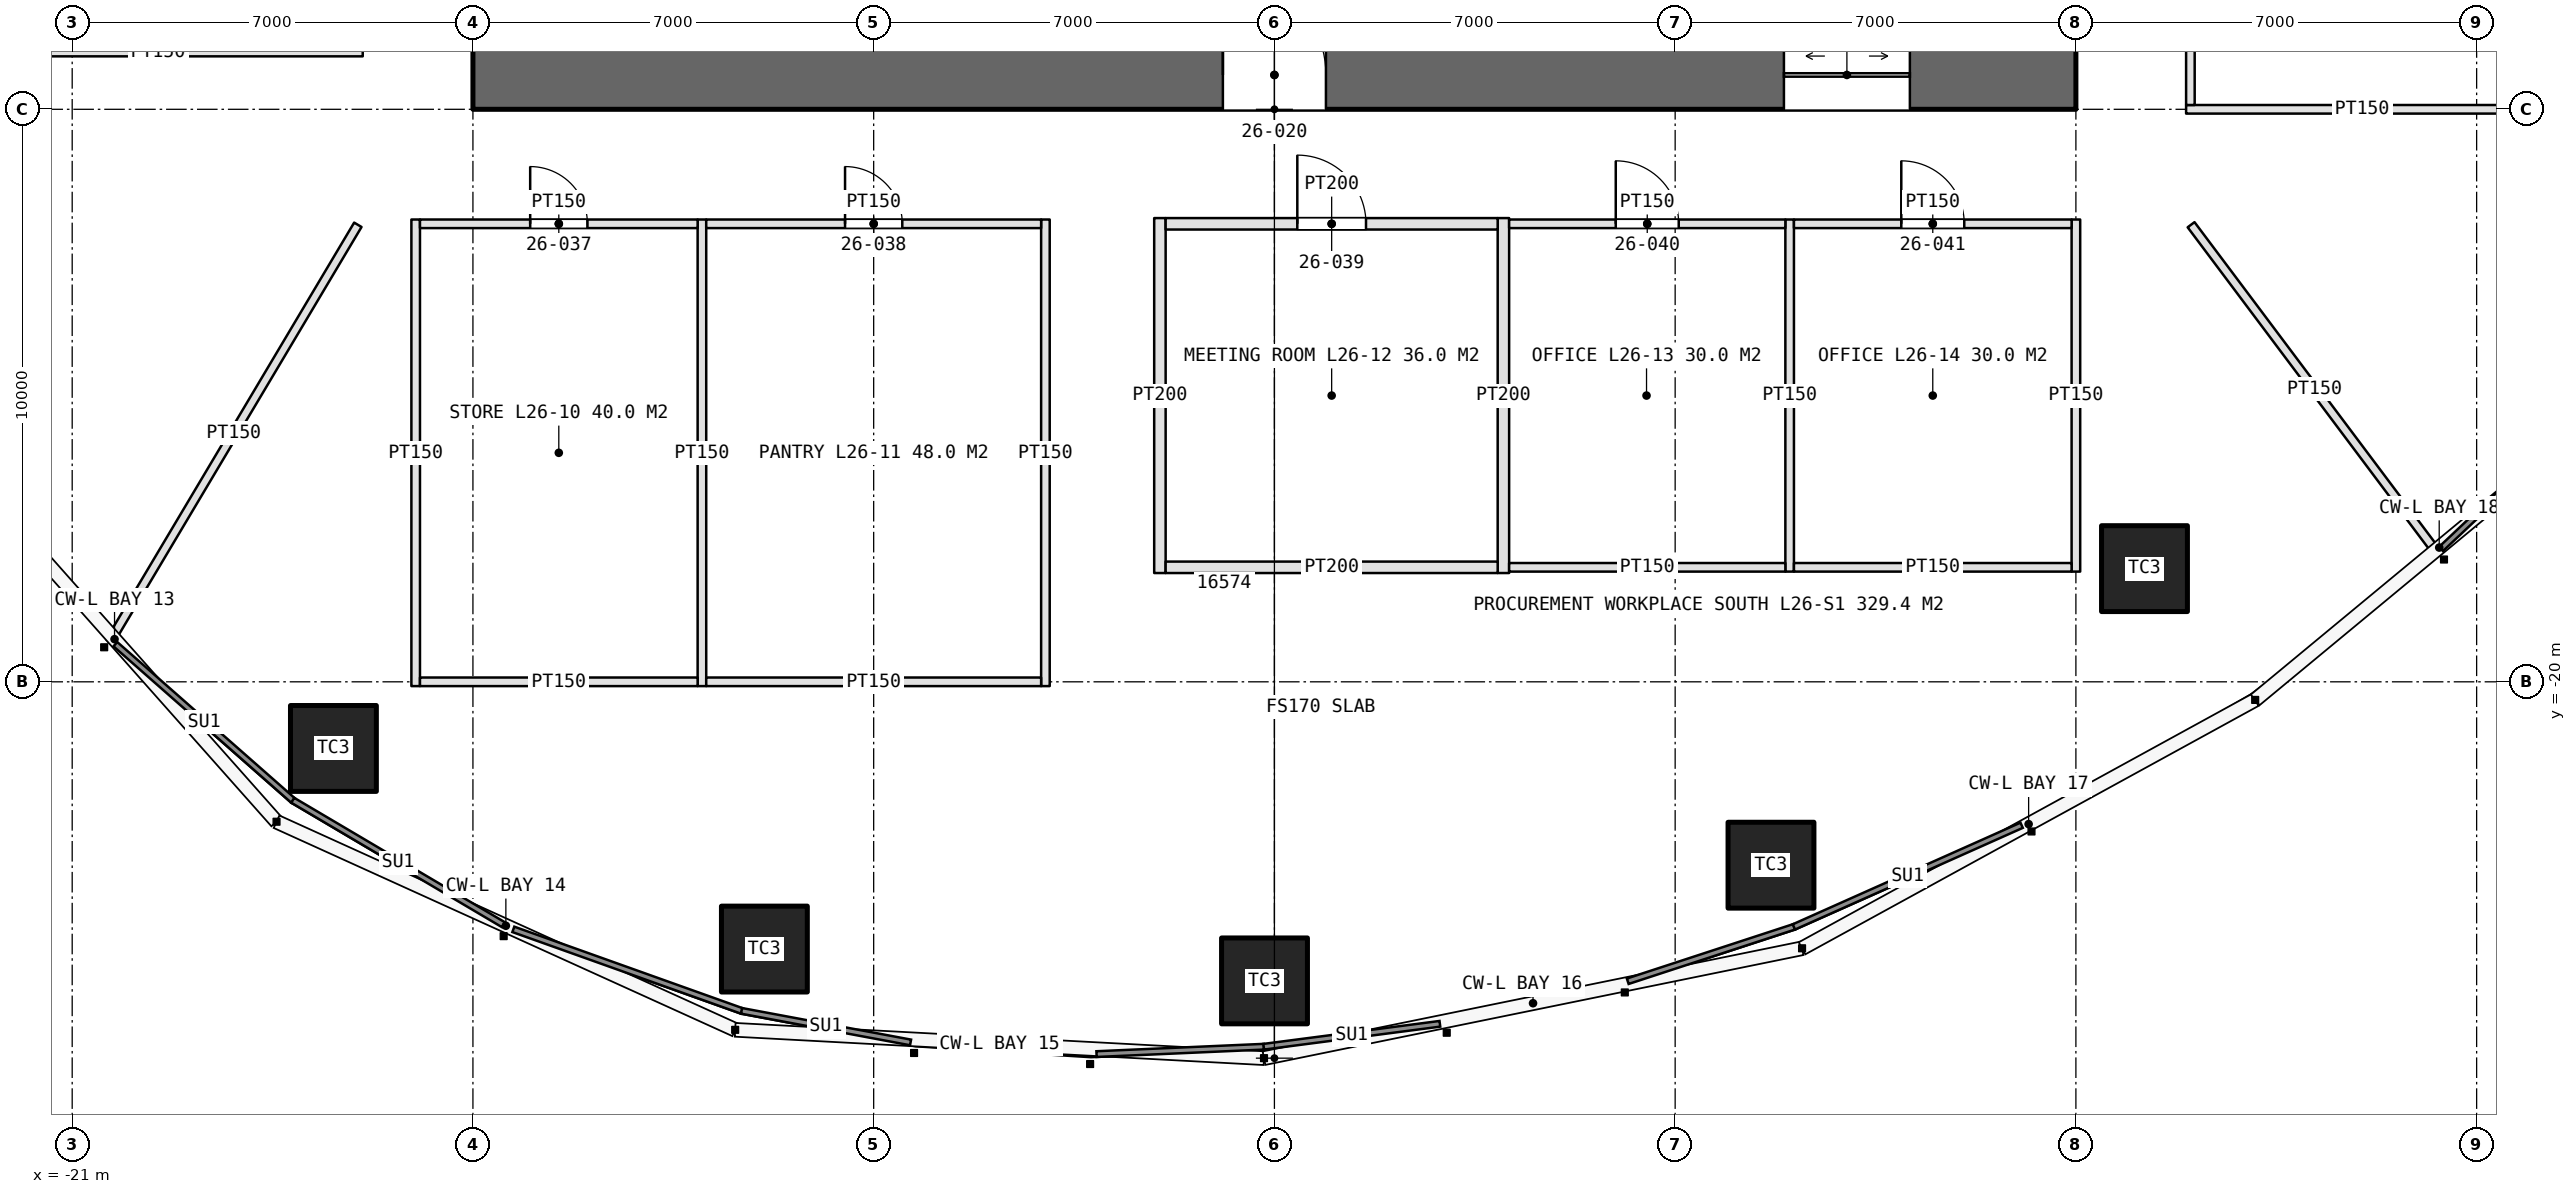
"""IFC4 building model, lengths in metres.
Left out: names, types, materials, properties, quantities, classifications, styles, units other than length and angle.
Written with IfcOpenShell. Run it as: python <this file> out.ifc"""

import sys

from ifc_helpers import new_model, si_unit, direction, frame, frame_2d, origin, origin_2d, place, context, subcontext, project, spatial, rectangle, extrude, element, fill, save


model = new_model("IFC4")
c1 = context("Model", 3, precision=1e-05, world=origin(), true_north=direction((0.0, 1.0)))
c2 = subcontext(c1, "Body", "Model", "MODEL_VIEW")
j1 = project(units=[si_unit("LENGTHUNIT", "METRE"), si_unit("PLANEANGLEUNIT", "RADIAN")], contexts=[c1])
p1 = place(None, origin())
s1 = spatial("IfcSite", under=j1, at=p1, CompositionType="ELEMENT")
p2 = place(p1, origin())
s2 = spatial("IfcBuilding", under=s1, at=p2, CompositionType="ELEMENT")
p3 = place(p2, frame((0.0, 0.0, 126.0)))
s3 = spatial("IfcBuildingStorey", under=s2, at=p3, CompositionType="ELEMENT", Elevation=126.0)
p4 = place(p3, frame((-14.0, -9.4, 0.0), z_axis=(0.0, 0.0, 1.0), x_axis=(1.0, 0.0, 0.0)))
e1 = element("IfcWall", 1, at=p4, inside=s3, PredefinedType="SHEAR", context=c2, shape_type="SweptSolid", body=[
    extrude(rectangle(XDim=28.0, YDim=1.2, at=frame_2d((14.0, 0.0))), origin(), (0.0, 0.0, 1.0), 4.2),
])
p5 = place(p4, frame((13.1, 0.0, 0.0)))
e2 = element("IfcOpeningElement", 2, at=p5, cuts=e1, PredefinedType="OPENING", context=c2, shape_type="SweptSolid", body=[
    extrude(rectangle(XDim=1.8, YDim=2.4, at=frame_2d((0.9, 1.2))), frame((0.0, 0.61, 0.0), z_axis=(0.0, -1.0, 0.0), x_axis=(1.0, 0.0, 0.0)), (0.0, 0.0, 1.0), 1.22),
])
p6 = place(p4, frame((22.9, 0.0, 0.0)))
e3 = element("IfcOpeningElement", 3, at=p6, cuts=e1, PredefinedType="OPENING", context=c2, shape_type="SweptSolid", body=[
    extrude(rectangle(XDim=2.2, YDim=2.7, at=frame_2d((1.1, 1.35))), frame((0.0, 0.61, 0.0), z_axis=(0.0, -1.0, 0.0), x_axis=(1.0, 0.0, 0.0)), (0.0, 0.0, 1.0), 1.22),
])
for number, where, z_axis, x_axis in (
    (4, (-16.437, -21.164, 0.0), (0.0, 0.0, 1.0), (1.0, 0.0, 0.0)),
    (5, (-8.909, -24.668, 0.0), (0.0, 0.0, 1.0), (1.0, 0.0, 0.0)),
    (6, (-0.173, -25.224, 0.0), (0.0, 0.0, 1.0), (1.0, 0.0, 0.0)),
    (7, (8.674, -23.203, 0.0), (0.0, 0.0, 1.0), (1.0, 0.0, 0.0)),
    (8, (15.198, -18.023, 0.0), (0.0, 0.0, 1.0), (1.0, 0.0, 0.0)),
):
    element("IfcColumn", number, at=place(p3, frame(where, z_axis=z_axis, x_axis=x_axis)), inside=s3, PredefinedType="COLUMN", context=c2, shape_type="SweptSolid", body=[
        extrude(rectangle(XDim=1.5, YDim=1.5, at=origin_2d()), origin(), (0.0, 0.0, 1.0), 4.2),
    ])
p7 = place(p3, frame((15.925, -10.0, 0.0), z_axis=(0.0, 0.0, 1.0), x_axis=(1.0, 0.0, 0.0)))
e9 = element("IfcWall", 9, at=p7, inside=s3, PredefinedType="PARTITIONING", context=c2, shape_type="SweptSolid", body=[
    extrude(rectangle(XDim=6.15, YDim=0.15, at=frame_2d((3.075, 0.0))), origin(), (0.0, 0.0, 1.0), 3.0),
])
p8 = place(p3, frame((16.0, -9.925, 0.0), z_axis=(0.0, 0.0, 1.0), x_axis=(0.0, 1.0, 0.0)))
e10 = element("IfcWall", 10, at=p8, inside=s3, PredefinedType="PARTITIONING", context=c2, shape_type="SweptSolid", body=[
    extrude(rectangle(XDim=4.85, YDim=0.15, at=frame_2d((2.425, 0.0))), origin(), (0.0, 0.0, 1.0), 3.0),
])
p9 = place(p8, frame((1.875, 0.0, 0.0)))
e11 = element("IfcOpeningElement", 11, at=p9, cuts=e10, PredefinedType="OPENING", context=c2, shape_type="SweptSolid", body=[
    extrude(rectangle(XDim=1.1, YDim=2.3, at=frame_2d((0.55, 1.15))), frame((0.0, 0.085, 0.0), z_axis=(0.0, -1.0, 0.0), x_axis=(1.0, 0.0, 0.0)), (0.0, 0.0, 1.0), 0.17),
])
for number, where, z_axis, x_axis in (
    (12, (-15.0, -11.925, 0.0), (0.0, 0.0, 1.0), (0.0, -1.0, 0.0)),
    (13, (-10.0, -11.925, 0.0), (0.0, 0.0, 1.0), (0.0, -1.0, 0.0)),
    (14, (-4.0, -11.925, 0.0), (0.0, 0.0, 1.0), (0.0, -1.0, 0.0)),
):
    element("IfcWall", number, at=place(p3, frame(where, z_axis=z_axis, x_axis=x_axis)), inside=s3, PredefinedType="PARTITIONING", context=c2, shape_type="SweptSolid", body=[
        extrude(rectangle(XDim=8.15, YDim=0.15, at=frame_2d((4.075, 0.0))), origin(), (0.0, 0.0, 1.0), 3.0),
    ])
p10 = place(p3, frame((-14.925, -12.0, 0.0), z_axis=(0.0, 0.0, 1.0), x_axis=(1.0, 0.0, 0.0)))
e15 = element("IfcWall", 15, at=p10, inside=s3, PredefinedType="PARTITIONING", context=c2, shape_type="SweptSolid", body=[
    extrude(rectangle(XDim=4.85, YDim=0.15, at=frame_2d((2.425, 0.0))), origin(), (0.0, 0.0, 1.0), 3.0),
])
p11 = place(p10, frame((1.925, 0.0, 0.0)))
e16 = element("IfcOpeningElement", 16, at=p11, cuts=e15, PredefinedType="OPENING", context=c2, shape_type="SweptSolid", body=[
    extrude(rectangle(XDim=1.0, YDim=2.2, at=frame_2d((0.5, 1.1))), frame((0.0, 0.085, 0.0), z_axis=(0.0, -1.0, 0.0), x_axis=(1.0, 0.0, 0.0)), (0.0, 0.0, 1.0), 0.17),
])
p12 = place(p3, frame((-14.925, -20.0, 0.0), z_axis=(0.0, 0.0, 1.0), x_axis=(1.0, 0.0, 0.0)))
e17 = element("IfcWall", 17, at=p12, inside=s3, PredefinedType="PARTITIONING", context=c2, shape_type="SweptSolid", body=[
    extrude(rectangle(XDim=4.85, YDim=0.15, at=frame_2d((2.425, 0.0))), origin(), (0.0, 0.0, 1.0), 3.0),
])
p13 = place(p3, frame((-9.925, -12.0, 0.0), z_axis=(0.0, 0.0, 1.0), x_axis=(1.0, 0.0, 0.0)))
e18 = element("IfcWall", 18, at=p13, inside=s3, PredefinedType="PARTITIONING", context=c2, shape_type="SweptSolid", body=[
    extrude(rectangle(XDim=5.85, YDim=0.15, at=frame_2d((2.925, 0.0))), origin(), (0.0, 0.0, 1.0), 3.0),
])
p14 = place(p13, frame((2.425, 0.0, 0.0)))
e19 = element("IfcOpeningElement", 19, at=p14, cuts=e18, PredefinedType="OPENING", context=c2, shape_type="SweptSolid", body=[
    extrude(rectangle(XDim=1.0, YDim=2.2, at=frame_2d((0.5, 1.1))), frame((0.0, 0.085, 0.0), z_axis=(0.0, -1.0, 0.0), x_axis=(1.0, 0.0, 0.0)), (0.0, 0.0, 1.0), 0.17),
])
p15 = place(p3, frame((-9.925, -20.0, 0.0), z_axis=(0.0, 0.0, 1.0), x_axis=(1.0, 0.0, 0.0)))
e20 = element("IfcWall", 20, at=p15, inside=s3, PredefinedType="PARTITIONING", context=c2, shape_type="SweptSolid", body=[
    extrude(rectangle(XDim=5.85, YDim=0.15, at=frame_2d((2.925, 0.0))), origin(), (0.0, 0.0, 1.0), 3.0),
])
for number, where, z_axis, x_axis in (
    (21, (-2.0, -11.9, 0.0), (0.0, 0.0, 1.0), (0.0, -1.0, 0.0)),
    (22, (4.0, -11.9, 0.0), (0.0, 0.0, 1.0), (0.0, -1.0, 0.0)),
):
    element("IfcWall", number, at=place(p3, frame(where, z_axis=z_axis, x_axis=x_axis)), inside=s3, PredefinedType="PARTITIONING", context=c2, shape_type="SweptSolid", body=[
        extrude(rectangle(XDim=6.2, YDim=0.2, at=frame_2d((3.1, 0.0))), origin(), (0.0, 0.0, 1.0), 3.0),
    ])
for number, where, z_axis, x_axis in (
    (23, (9.0, -11.925, 0.0), (0.0, 0.0, 1.0), (0.0, -1.0, 0.0)),
    (24, (14.0, -11.925, 0.0), (0.0, 0.0, 1.0), (0.0, -1.0, 0.0)),
):
    element("IfcWall", number, at=place(p3, frame(where, z_axis=z_axis, x_axis=x_axis)), inside=s3, PredefinedType="PARTITIONING", context=c2, shape_type="SweptSolid", body=[
        extrude(rectangle(XDim=6.15, YDim=0.15, at=frame_2d((3.075, 0.0))), origin(), (0.0, 0.0, 1.0), 3.0),
    ])
p16 = place(p3, frame((-1.9, -12.0, 0.0), z_axis=(0.0, 0.0, 1.0), x_axis=(1.0, 0.0, 0.0)))
e25 = element("IfcWall", 25, at=p16, inside=s3, PredefinedType="PARTITIONING", context=c2, shape_type="SweptSolid", body=[
    extrude(rectangle(XDim=5.8, YDim=0.2, at=frame_2d((2.9, 0.0))), origin(), (0.0, 0.0, 1.0), 3.0),
])
p17 = place(p16, frame((2.3, 0.0, 0.0)))
e26 = element("IfcOpeningElement", 26, at=p17, cuts=e25, PredefinedType="OPENING", context=c2, shape_type="SweptSolid", body=[
    extrude(rectangle(XDim=1.2, YDim=2.4, at=frame_2d((0.6, 1.2))), frame((0.0, 0.11, 0.0), z_axis=(0.0, -1.0, 0.0), x_axis=(1.0, 0.0, 0.0)), (0.0, 0.0, 1.0), 0.22),
])
p18 = place(p3, frame((-1.9, -18.0, 0.0), z_axis=(0.0, 0.0, 1.0), x_axis=(1.0, 0.0, 0.0)))
e27 = element("IfcWall", 27, at=p18, inside=s3, PredefinedType="PARTITIONING", context=c2, shape_type="SweptSolid", body=[
    extrude(rectangle(XDim=5.8, YDim=0.2, at=frame_2d((2.9, 0.0))), origin(), (0.0, 0.0, 1.0), 3.0),
])
p19 = place(p3, frame((4.1, -12.0, 0.0), z_axis=(0.0, 0.0, 1.0), x_axis=(1.0, 0.0, 0.0)))
e28 = element("IfcWall", 28, at=p19, inside=s3, PredefinedType="PARTITIONING", context=c2, shape_type="SweptSolid", body=[
    extrude(rectangle(XDim=4.825, YDim=0.15, at=frame_2d((2.413, 0.0))), origin(), (0.0, 0.0, 1.0), 3.0),
])
p20 = place(p19, frame((1.863, 0.0, 0.0)))
e29 = element("IfcOpeningElement", 29, at=p20, cuts=e28, PredefinedType="OPENING", context=c2, shape_type="SweptSolid", body=[
    extrude(rectangle(XDim=1.1, YDim=2.3, at=frame_2d((0.55, 1.15))), frame((0.0, 0.085, 0.0), z_axis=(0.0, -1.0, 0.0), x_axis=(1.0, 0.0, 0.0)), (0.0, 0.0, 1.0), 0.17),
])
p21 = place(p3, frame((4.1, -18.0, 0.0), z_axis=(0.0, 0.0, 1.0), x_axis=(1.0, 0.0, 0.0)))
e30 = element("IfcWall", 30, at=p21, inside=s3, PredefinedType="PARTITIONING", context=c2, shape_type="SweptSolid", body=[
    extrude(rectangle(XDim=4.825, YDim=0.15, at=frame_2d((2.413, 0.0))), origin(), (0.0, 0.0, 1.0), 3.0),
])
p22 = place(p3, frame((9.075, -12.0, 0.0), z_axis=(0.0, 0.0, 1.0), x_axis=(1.0, 0.0, 0.0)))
e31 = element("IfcWall", 31, at=p22, inside=s3, PredefinedType="PARTITIONING", context=c2, shape_type="SweptSolid", body=[
    extrude(rectangle(XDim=4.85, YDim=0.15, at=frame_2d((2.425, 0.0))), origin(), (0.0, 0.0, 1.0), 3.0),
])
p23 = place(p22, frame((1.875, 0.0, 0.0)))
e32 = element("IfcOpeningElement", 32, at=p23, cuts=e31, PredefinedType="OPENING", context=c2, shape_type="SweptSolid", body=[
    extrude(rectangle(XDim=1.1, YDim=2.3, at=frame_2d((0.55, 1.15))), frame((0.0, 0.085, 0.0), z_axis=(0.0, -1.0, 0.0), x_axis=(1.0, 0.0, 0.0)), (0.0, 0.0, 1.0), 0.17),
])
p24 = place(p3, frame((9.075, -18.0, 0.0), z_axis=(0.0, 0.0, 1.0), x_axis=(1.0, 0.0, 0.0)))
e33 = element("IfcWall", 33, at=p24, inside=s3, PredefinedType="PARTITIONING", context=c2, shape_type="SweptSolid", body=[
    extrude(rectangle(XDim=4.85, YDim=0.15, at=frame_2d((2.425, 0.0))), origin(), (0.0, 0.0, 1.0), 3.0),
])
p25 = place(p3, frame((-15.925, -9.0, 0.0), z_axis=(0.0, 0.0, 1.0), x_axis=(-1.0, 0.0, 0.0)))
e34 = element("IfcWall", 34, at=p25, inside=s3, PredefinedType="PARTITIONING", context=c2, shape_type="SweptSolid", body=[
    extrude(rectangle(XDim=7.15, YDim=0.15, at=frame_2d((3.575, 0.0))), origin(), (0.0, 0.0, 1.0), 3.0),
])
p26 = place(p3, frame((-16.01, -12.017, 0.0), z_axis=(0.0, 0.0, 1.0), x_axis=(-0.511508688443, -0.85927810495, 0.0)))
e35 = element("IfcWall", 35, at=p26, inside=s3, PredefinedType="PARTITIONING", context=c2, shape_type="SweptSolid", body=[
    extrude(rectangle(XDim=8.47, YDim=0.15, at=frame_2d((4.235, 0.0))), origin(), (0.0, 0.0, 1.0), 3.0),
])
p27 = place(p3, frame((16.012, -12.016, 0.0), z_axis=(0.0, 0.0, 1.0), x_axis=(0.600059749679, -0.799955184254, 0.0)))
e36 = element("IfcWall", 36, at=p27, inside=s3, PredefinedType="PARTITIONING", context=c2, shape_type="SweptSolid", body=[
    extrude(rectangle(XDim=7.191, YDim=0.15, at=frame_2d((3.596, 0.0))), origin(), (0.0, 0.0, 1.0), 3.0),
])
p28 = place(p5, origin())
e37 = element("IfcDoor", 37, at=p28, inside=s3, OperationType="DOUBLE_DOOR_SINGLE_SWING", PredefinedType="DOOR", context=c2, shape_type="SweptSolid", body=[
    extrude(rectangle(XDim=1.8, YDim=2.4, at=frame_2d((0.9, 1.2))), frame((0.0, 0.025, 0.0), z_axis=(0.0, -1.0, 0.0), x_axis=(1.0, 0.0, 0.0)), (0.0, 0.0, 1.0), 0.05),
])
fill(e2, e37)
p29 = place(p6, origin())
e38 = element("IfcDoor", 38, at=p29, inside=s3, OperationType="DOUBLE_DOOR_SLIDING", PredefinedType="DOOR", context=c2, shape_type="SweptSolid", body=[
    extrude(rectangle(XDim=2.2, YDim=2.7, at=frame_2d((1.1, 1.35))), frame((0.0, 0.025, 0.0), z_axis=(0.0, -1.0, 0.0), x_axis=(1.0, 0.0, 0.0)), (0.0, 0.0, 1.0), 0.05),
])
fill(e3, e38)
p30 = place(p11, origin())
e39 = element("IfcDoor", 39, at=p30, inside=s3, OperationType="SINGLE_SWING_LEFT", PredefinedType="DOOR", context=c2, shape_type="SweptSolid", body=[
    extrude(rectangle(XDim=1.0, YDim=2.2, at=frame_2d((0.5, 1.1))), frame((0.0, 0.025, 0.0), z_axis=(0.0, -1.0, 0.0), x_axis=(1.0, 0.0, 0.0)), (0.0, 0.0, 1.0), 0.05),
])
fill(e16, e39)
p31 = place(p14, origin())
e40 = element("IfcDoor", 40, at=p31, inside=s3, OperationType="SINGLE_SWING_LEFT", PredefinedType="DOOR", context=c2, shape_type="SweptSolid", body=[
    extrude(rectangle(XDim=1.0, YDim=2.2, at=frame_2d((0.5, 1.1))), frame((0.0, 0.025, 0.0), z_axis=(0.0, -1.0, 0.0), x_axis=(1.0, 0.0, 0.0)), (0.0, 0.0, 1.0), 0.05),
])
fill(e19, e40)
p32 = place(p17, origin())
e41 = element("IfcDoor", 41, at=p32, inside=s3, OperationType="SINGLE_SWING_LEFT", PredefinedType="DOOR", context=c2, shape_type="SweptSolid", body=[
    extrude(rectangle(XDim=1.2, YDim=2.4, at=frame_2d((0.6, 1.2))), frame((0.0, 0.025, 0.0), z_axis=(0.0, -1.0, 0.0), x_axis=(1.0, 0.0, 0.0)), (0.0, 0.0, 1.0), 0.05),
])
fill(e26, e41)
p33 = place(p20, origin())
e42 = element("IfcDoor", 42, at=p33, inside=s3, OperationType="SINGLE_SWING_LEFT", PredefinedType="DOOR", context=c2, shape_type="SweptSolid", body=[
    extrude(rectangle(XDim=1.1, YDim=2.3, at=frame_2d((0.55, 1.15))), frame((0.0, 0.025, 0.0), z_axis=(0.0, -1.0, 0.0), x_axis=(1.0, 0.0, 0.0)), (0.0, 0.0, 1.0), 0.05),
])
fill(e29, e42)
p34 = place(p23, origin())
e43 = element("IfcDoor", 43, at=p34, inside=s3, OperationType="SINGLE_SWING_LEFT", PredefinedType="DOOR", context=c2, shape_type="SweptSolid", body=[
    extrude(rectangle(XDim=1.1, YDim=2.3, at=frame_2d((0.55, 1.15))), frame((0.0, 0.025, 0.0), z_axis=(0.0, -1.0, 0.0), x_axis=(1.0, 0.0, 0.0)), (0.0, 0.0, 1.0), 0.05),
])
fill(e32, e43)
save(model, sys.argv[1])
